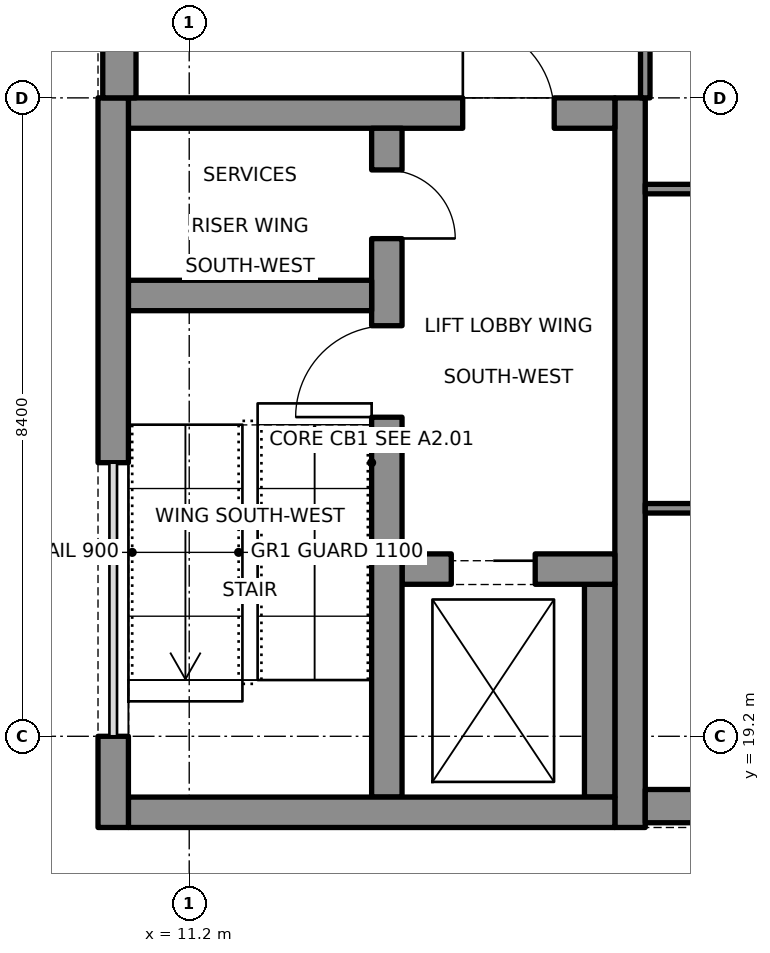
"""IFC4 building model, lengths in metres.
Left out: names, types, materials, properties, quantities, classifications, styles, units other than length and angle.
Written with IfcOpenShell. Run it as: python <this file> out.ifc"""

import sys

from ifc_helpers import new_model, si_unit, direction, frame, frame_2d, origin, place, context, subcontext, project, spatial, rectangle, extrude, element, fill, save


model = new_model("IFC4")
c1 = context("Model", 3, precision=1e-05, world=origin(), true_north=direction((0.0, 1.0)))
c2 = subcontext(c1, "Body", "Model", "MODEL_VIEW")
j1 = project(units=[si_unit("LENGTHUNIT", "METRE"), si_unit("PLANEANGLEUNIT", "RADIAN")], contexts=[c1])
p1 = place(None, origin())
s1 = spatial("IfcSite", under=j1, at=p1, CompositionType="ELEMENT")
p2 = place(p1, origin())
s2 = spatial("IfcBuilding", under=s1, at=p2, CompositionType="ELEMENT")
p3 = place(p2, frame((0.0, 0.0, 4.4)))
s3 = spatial("IfcBuildingStorey", under=s2, at=p3, CompositionType="ELEMENT", Elevation=4.4)
p4 = place(p3, frame((17.2, 18.281, 0.0), z_axis=(0.0, 0.0, 1.0), x_axis=(1.0, 0.0, 0.0)))
e1 = element("IfcWall", 1, at=p4, inside=s3, PredefinedType="SOLIDWALL", context=c2, shape_type="SweptSolid", body=[
    extrude(rectangle(XDim=9.6, YDim=0.438, at=frame_2d((4.8, 0.0))), origin(), (0.0, 0.0, 1.0), 4.4),
])
p5 = place(p4, frame((2.1, 0.0, 0.75)))
e2 = element("IfcOpeningElement", 2, at=p5, cuts=e1, PredefinedType="OPENING", context=c2, shape_type="SweptSolid", body=[
    extrude(rectangle(XDim=1.8, YDim=2.8, at=frame_2d((0.9, 1.4))), frame((0.0, 0.229, 0.0), z_axis=(0.0, -1.0, 0.0), x_axis=(1.0, 0.0, 0.0)), (0.0, 0.0, 1.0), 0.458),
])
p6 = place(p4, frame((5.7, 0.0, 0.75)))
e3 = element("IfcOpeningElement", 3, at=p6, cuts=e1, PredefinedType="OPENING", context=c2, shape_type="SweptSolid", body=[
    extrude(rectangle(XDim=1.8, YDim=2.8, at=frame_2d((0.9, 1.4))), frame((0.0, 0.229, 0.0), z_axis=(0.0, -1.0, 0.0), x_axis=(1.0, 0.0, 0.0)), (0.0, 0.0, 1.0), 0.458),
])
p7 = place(p3, frame((10.281, 27.6, 0.0), z_axis=(0.0, 0.0, 1.0), x_axis=(0.0, 1.0, 0.0)))
e4 = element("IfcWall", 4, at=p7, inside=s3, PredefinedType="SOLIDWALL", context=c2, shape_type="SweptSolid", body=[
    extrude(rectangle(XDim=2.4, YDim=0.438, at=frame_2d((1.2, 0.0))), origin(), (0.0, 0.0, 1.0), 4.4),
])
p8 = place(p3, frame((10.2, 18.0, 0.0), z_axis=(0.0, 0.0, 1.0), x_axis=(0.0, 1.0, 0.0)))
e5 = element("IfcWall", 5, at=p8, inside=s3, PredefinedType="SHEAR", context=c2, shape_type="SweptSolid", body=[
    extrude(rectangle(XDim=1.2, YDim=0.4, at=frame_2d((0.6, 0.0))), origin(), (0.0, 0.0, 1.0), 4.4),
])
p9 = place(p3, frame((10.2, 22.8, 0.0), z_axis=(0.0, 0.0, 1.0), x_axis=(0.0, 1.0, 0.0)))
e6 = element("IfcWall", 6, at=p9, inside=s3, PredefinedType="SHEAR", context=c2, shape_type="SweptSolid", body=[
    extrude(rectangle(XDim=4.8, YDim=0.4, at=frame_2d((2.4, 0.0))), origin(), (0.0, 0.0, 1.0), 4.4),
])
p10 = place(p3, frame((17.0, 18.0, 0.0), z_axis=(0.0, 0.0, 1.0), x_axis=(0.0, 1.0, 0.0)))
e7 = element("IfcWall", 7, at=p10, inside=s3, PredefinedType="SHEAR", context=c2, shape_type="SweptSolid", body=[
    extrude(rectangle(XDim=9.6, YDim=0.4, at=frame_2d((4.8, 0.0))), origin(), (0.0, 0.0, 1.0), 4.4),
])
p11 = place(p3, frame((10.4, 18.2, 0.0), z_axis=(0.0, 0.0, 1.0), x_axis=(1.0, 0.0, 0.0)))
e8 = element("IfcWall", 8, at=p11, inside=s3, PredefinedType="SHEAR", context=c2, shape_type="SweptSolid", body=[
    extrude(rectangle(XDim=6.4, YDim=0.4, at=frame_2d((3.2, 0.0))), origin(), (0.0, 0.0, 1.0), 4.4),
])
p12 = place(p3, frame((10.4, 27.4, 0.0), z_axis=(0.0, 0.0, 1.0), x_axis=(1.0, 0.0, 0.0)))
e9 = element("IfcWall", 9, at=p12, inside=s3, PredefinedType="SHEAR", context=c2, shape_type="SweptSolid", body=[
    extrude(rectangle(XDim=6.4, YDim=0.4, at=frame_2d((3.2, 0.0))), origin(), (0.0, 0.0, 1.0), 4.4),
])
p13 = place(p12, frame((4.4, 0.0, 0.0)))
e10 = element("IfcOpeningElement", 10, at=p13, cuts=e9, PredefinedType="OPENING", context=c2, shape_type="SweptSolid", body=[
    extrude(rectangle(XDim=1.2, YDim=2.1, at=frame_2d((0.6, 1.05))), frame((0.0, 0.21, 0.0), z_axis=(0.0, -1.0, 0.0), x_axis=(1.0, 0.0, 0.0)), (0.0, 0.0, 1.0), 0.42),
])
p14 = place(p3, frame((13.8, 18.4, 0.0), z_axis=(0.0, 0.0, 1.0), x_axis=(0.0, 1.0, 0.0)))
e11 = element("IfcWall", 11, at=p14, inside=s3, PredefinedType="SHEAR", context=c2, shape_type="SweptSolid", body=[
    extrude(rectangle(XDim=8.8, YDim=0.4, at=frame_2d((4.4, 0.0))), origin(), (0.0, 0.0, 1.0), 4.4),
])
p15 = place(p14, frame((5.0, 0.0, 0.0)))
e12 = element("IfcOpeningElement", 12, at=p15, cuts=e11, PredefinedType="OPENING", context=c2, shape_type="SweptSolid", body=[
    extrude(rectangle(XDim=1.2, YDim=2.1, at=frame_2d((0.6, 1.05))), frame((0.0, 0.21, 0.0), z_axis=(0.0, -1.0, 0.0), x_axis=(1.0, 0.0, 0.0)), (0.0, 0.0, 1.0), 0.42),
])
p16 = place(p14, frame((7.35, 0.0, 0.0)))
e13 = element("IfcOpeningElement", 13, at=p16, cuts=e11, PredefinedType="OPENING", context=c2, shape_type="SweptSolid", body=[
    extrude(rectangle(XDim=0.9, YDim=2.1, at=frame_2d((0.45, 1.05))), frame((0.0, 0.21, 0.0), z_axis=(0.0, -1.0, 0.0), x_axis=(1.0, 0.0, 0.0)), (0.0, 0.0, 1.0), 0.42),
])
p17 = place(p3, frame((10.4, 25.0, 0.0), z_axis=(0.0, 0.0, 1.0), x_axis=(1.0, 0.0, 0.0)))
e14 = element("IfcWall", 14, at=p17, inside=s3, PredefinedType="SHEAR", context=c2, shape_type="SweptSolid", body=[
    extrude(rectangle(XDim=3.2, YDim=0.4, at=frame_2d((1.6, 0.0))), origin(), (0.0, 0.0, 1.0), 4.4),
])
p18 = place(p3, frame((14.0, 21.4, 0.0), z_axis=(0.0, 0.0, 1.0), x_axis=(1.0, 0.0, 0.0)))
e15 = element("IfcWall", 15, at=p18, inside=s3, PredefinedType="SHEAR", context=c2, shape_type="SweptSolid", body=[
    extrude(rectangle(XDim=2.8, YDim=0.4, at=frame_2d((1.4, 0.0))), origin(), (0.0, 0.0, 1.0), 4.4),
])
p19 = place(p18, frame((0.65, 0.0, 0.0)))
e16 = element("IfcOpeningElement", 16, at=p19, cuts=e15, PredefinedType="OPENING", context=c2, shape_type="SweptSolid", body=[
    extrude(rectangle(XDim=1.1, YDim=2.1, at=frame_2d((0.55, 1.05))), frame((0.0, 0.21, 0.0), z_axis=(0.0, -1.0, 0.0), x_axis=(1.0, 0.0, 0.0)), (0.0, 0.0, 1.0), 0.42),
])
p20 = place(p3, frame((16.6, 18.4, 0.0), z_axis=(0.0, 0.0, 1.0), x_axis=(0.0, 1.0, 0.0)))
e17 = element("IfcWall", 17, at=p20, inside=s3, PredefinedType="SHEAR", context=c2, shape_type="SweptSolid", body=[
    extrude(rectangle(XDim=2.8, YDim=0.4, at=frame_2d((1.4, 0.0))), origin(), (0.0, 0.0, 1.0), 4.4),
])
for number, where, z_axis, x_axis in (
    (18, (17.2, 22.2, 0.0), (0.0, 0.0, 1.0), (1.0, 0.0, 0.0)),
    (19, (17.2, 26.4, 0.0), (0.0, 0.0, 1.0), (1.0, 0.0, 0.0)),
):
    element("IfcWall", number, at=place(p3, frame(where, z_axis=z_axis, x_axis=x_axis)), inside=s3, PredefinedType="PARTITIONING", context=c2, shape_type="SweptSolid", body=[
        extrude(rectangle(XDim=10.738, YDim=0.125, at=frame_2d((5.369, 0.0))), origin(), (0.0, 0.0, 1.0), 3.65),
    ])
p21 = place(p3, frame((17.2, 27.6, 0.0), z_axis=(0.0, 0.0, 1.0), x_axis=(0.0, 1.0, 0.0)))
e20 = element("IfcWall", 20, at=p21, inside=s3, PredefinedType="PARTITIONING", context=c2, shape_type="SweptSolid", body=[
    extrude(rectangle(XDim=2.938, YDim=0.125, at=frame_2d((1.469, 0.0))), origin(), (0.0, 0.0, 1.0), 3.65),
])
p22 = place(p13, origin())
e21 = element("IfcDoor", 21, at=p22, inside=s3, OperationType="SINGLE_SWING_LEFT", PredefinedType="DOOR", context=c2, shape_type="SweptSolid", body=[
    extrude(rectangle(XDim=1.2, YDim=2.1, at=frame_2d((0.6, 1.05))), frame((0.0, 0.025, 0.0), z_axis=(0.0, -1.0, 0.0), x_axis=(1.0, 0.0, 0.0)), (0.0, 0.0, 1.0), 0.05),
])
fill(e10, e21)
p23 = place(p15, origin())
e22 = element("IfcDoor", 22, at=p23, inside=s3, OperationType="SINGLE_SWING_LEFT", PredefinedType="DOOR", context=c2, shape_type="SweptSolid", body=[
    extrude(rectangle(XDim=1.2, YDim=2.1, at=frame_2d((0.6, 1.05))), frame((0.0, 0.025, 0.0), z_axis=(0.0, -1.0, 0.0), x_axis=(1.0, 0.0, 0.0)), (0.0, 0.0, 1.0), 0.05),
])
fill(e12, e22)
p24 = place(p16, origin())
e23 = element("IfcDoor", 23, at=p24, inside=s3, OperationType="SINGLE_SWING_LEFT", PredefinedType="DOOR", context=c2, shape_type="SweptSolid", body=[
    extrude(rectangle(XDim=0.9, YDim=2.1, at=frame_2d((0.45, 1.05))), frame((0.0, 0.025, 0.0), z_axis=(0.0, -1.0, 0.0), x_axis=(1.0, 0.0, 0.0)), (0.0, 0.0, 1.0), 0.05),
])
fill(e13, e23)
p25 = place(p19, origin())
e24 = element("IfcDoor", 24, at=p25, inside=s3, OperationType="SLIDING_TO_LEFT", PredefinedType="DOOR", context=c2, shape_type="SweptSolid", body=[
    extrude(rectangle(XDim=1.1, YDim=2.1, at=frame_2d((0.55, 1.05))), frame((0.0, 0.025, 0.0), z_axis=(0.0, -1.0, 0.0), x_axis=(1.0, 0.0, 0.0)), (0.0, 0.0, 1.0), 0.05),
])
fill(e16, e24)
save(model, sys.argv[1])
